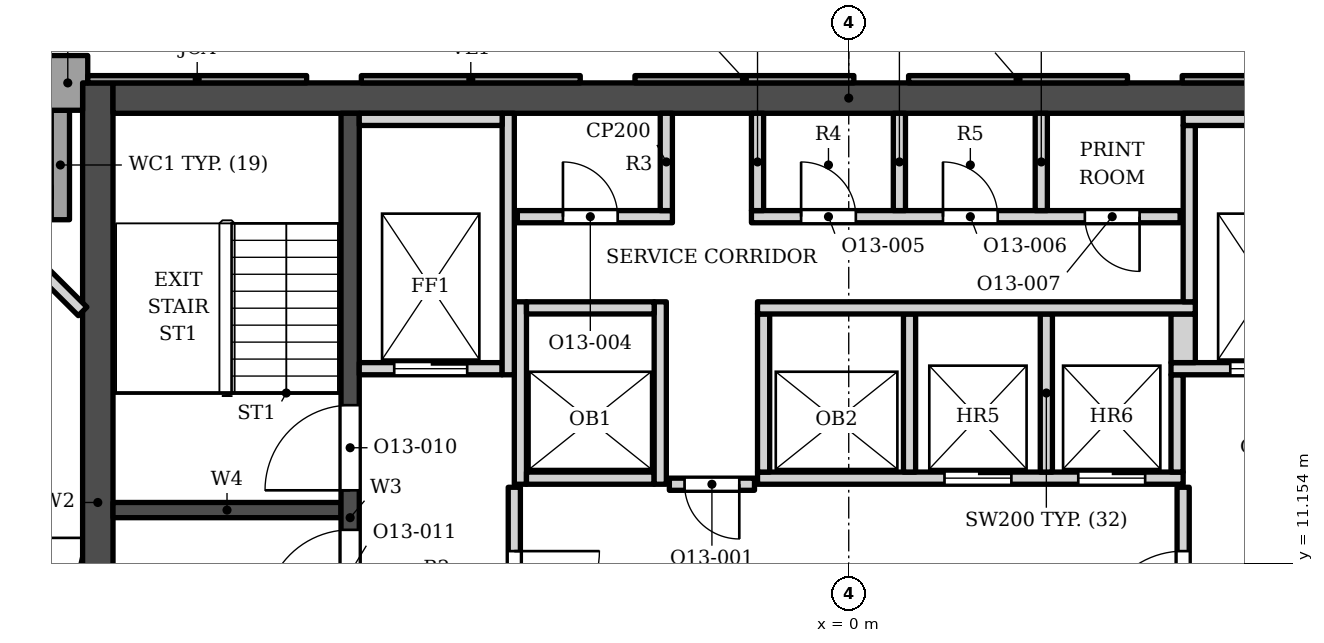
"""IFC4 building model, lengths in metres.
Left out: names, types, materials, properties, quantities, classifications, styles, units other than length and angle.
Written with IfcOpenShell. Run it as: python <this file> out.ifc"""

import sys

from ifc_helpers import new_model, si_unit, direction, frame, frame_2d, origin, place, context, subcontext, project, spatial, polyline, rectangle, outline, extrude, element, fill, save


model = new_model("IFC4")
c1 = context("Model", 3, precision=1e-05, world=origin(), true_north=direction((0.0, 1.0)))
c2 = subcontext(c1, "Body", "Model", "MODEL_VIEW")
j1 = project(units=[si_unit("LENGTHUNIT", "METRE"), si_unit("PLANEANGLEUNIT", "RADIAN")], contexts=[c1])
p1 = place(None, origin())
s1 = spatial("IfcSite", under=j1, at=p1, CompositionType="ELEMENT")
p2 = place(p1, origin())
s2 = spatial("IfcBuilding", under=s1, at=p2, CompositionType="ELEMENT")
p3 = place(p2, frame((0.0, 0.0, 287.2)))
s3 = spatial("IfcBuildingStorey", under=s2, at=p3, CompositionType="ELEMENT", Elevation=287.2)
p4 = place(p3, frame((-12.1, 18.802, 0.0), z_axis=(0.0, 0.0, 1.0), x_axis=(1.0, 0.0, 0.0)))
e1 = element("IfcWall", 1, at=p4, inside=s3, PredefinedType="SHEAR", context=c2, shape_type="SweptSolid", body=[
    extrude(rectangle(XDim=24.2, YDim=0.5, at=frame_2d((12.1, 0.0))), origin(), (0.0, 0.0, 1.0), 3.9),
])
p5 = place(p3, frame((-12.35, 5.253, 0.0), z_axis=(0.0, 0.0, 1.0), x_axis=(0.0, 1.0, 0.0)))
e2 = element("IfcWall", 2, at=p5, inside=s3, PredefinedType="SHEAR", context=c2, shape_type="SweptSolid", body=[
    extrude(rectangle(XDim=13.8, YDim=0.5, at=frame_2d((6.9, 0.0))), origin(), (0.0, 0.0, 1.0), 3.9),
])
p6 = place(p3, frame((-8.2, 5.253, 0.0), z_axis=(0.0, 0.0, 1.0), x_axis=(0.0, 1.0, 0.0)))
e3 = element("IfcWall", 3, at=p6, inside=s3, PredefinedType="SHEAR", context=c2, shape_type="SweptSolid", body=[
    extrude(rectangle(XDim=13.3, YDim=0.3, at=frame_2d((6.65, 0.0))), origin(), (0.0, 0.0, 1.0), 3.9),
])
p7 = place(p6, frame((7.1, 0.0, 0.0)))
e4 = element("IfcOpeningElement", 4, at=p7, cuts=e3, PredefinedType="OPENING", context=c2, shape_type="SweptSolid", body=[
    extrude(rectangle(XDim=1.4, YDim=2.1, at=frame_2d((0.7, 1.05))), frame((0.0, 0.16, 0.0), z_axis=(0.0, -1.0, 0.0), x_axis=(1.0, 0.0, 0.0)), (0.0, 0.0, 1.0), 0.32),
])
p8 = place(p6, frame((5.05, 0.0, 0.0)))
e5 = element("IfcOpeningElement", 5, at=p8, cuts=e3, PredefinedType="OPENING", context=c2, shape_type="SweptSolid", body=[
    extrude(rectangle(XDim=1.4, YDim=2.1, at=frame_2d((0.7, 1.05))), frame((0.0, 0.16, 0.0), z_axis=(0.0, -1.0, 0.0), x_axis=(1.0, 0.0, 0.0)), (0.0, 0.0, 1.0), 0.32),
])
p9 = place(p3, frame((-12.1, 12.028, 0.0), z_axis=(0.0, 0.0, 1.0), x_axis=(1.0, 0.0, 0.0)))
e6 = element("IfcWall", 6, at=p9, inside=s3, PredefinedType="SHEAR", context=c2, shape_type="SweptSolid", body=[
    extrude(rectangle(XDim=3.75, YDim=0.25, at=frame_2d((1.875, 0.0))), origin(), (0.0, 0.0, 1.0), 3.9),
])
p10 = place(p3, origin())
e7 = element("IfcWall", 7, at=p10, inside=s3, PredefinedType="SOLIDWALL", context=c2, shape_type="SweptSolid", body=[
    extrude(outline(polyline([(-12.516, 19.052), (-12.516, 19.502), (-13.416, 19.502), (-13.416, 18.603), (-12.6, 18.603), (-12.6, 19.052), (-12.516, 19.052)])), origin(), (0.0, 0.0, 1.0), 3.0),
])
p11 = place(p3, origin())
e8 = element("IfcWall", 8, at=p11, inside=s3, PredefinedType="SOLIDWALL", context=c2, shape_type="SweptSolid", body=[
    extrude(outline(polyline([(-12.816, 16.802), (-12.816, 18.603), (-13.116, 18.603), (-13.116, 16.802), (-12.816, 16.802)])), origin(), (0.0, 0.0, 1.0), 3.0),
])
p12 = place(p3, origin())
e9 = element("IfcWall", 9, at=p12, inside=s3, PredefinedType="SOLIDWALL", context=c2, shape_type="SweptSolid", body=[
    extrude(outline(polyline([(5.484, 19.173), (5.484, 19.052), (9.084, 19.052), (9.084, 19.173), (5.484, 19.173)])), origin(), (0.0, 0.0, 1.0), 3.0),
])
p13 = place(p3, origin())
e10 = element("IfcWall", 10, at=p13, inside=s3, PredefinedType="ELEMENTEDWALL", context=c2, shape_type="SweptSolid", body=[
    extrude(outline(polyline([(0.984, 19.173), (0.984, 19.052), (4.584, 19.052), (4.584, 19.173), (0.984, 19.173)])), origin(), (0.0, 0.0, 1.0), 3.0),
])
p14 = place(p3, origin())
e11 = element("IfcWall", 11, at=p14, inside=s3, PredefinedType="SOLIDWALL", context=c2, shape_type="SweptSolid", body=[
    extrude(outline(polyline([(-3.516, 19.173), (-3.516, 19.052), (0.084, 19.052), (0.084, 19.173), (-3.516, 19.173)])), origin(), (0.0, 0.0, 1.0), 3.0),
])
p15 = place(p3, origin())
e12 = element("IfcWall", 12, at=p15, inside=s3, PredefinedType="ELEMENTEDWALL", context=c2, shape_type="SweptSolid", body=[
    extrude(outline(polyline([(-8.016, 19.173), (-8.016, 19.052), (-4.416, 19.052), (-4.416, 19.173), (-8.016, 19.173)])), origin(), (0.0, 0.0, 1.0), 3.0),
])
p16 = place(p3, origin())
e13 = element("IfcWall", 13, at=p16, inside=s3, PredefinedType="SOLIDWALL", context=c2, shape_type="SweptSolid", body=[
    extrude(outline(polyline([(-12.515, 19.173), (-12.515, 19.052), (-8.916, 19.052), (-8.916, 19.173), (-12.515, 19.173)])), origin(), (0.0, 0.0, 1.0), 3.0),
])
p17 = place(p3, frame((-5.5, 9.103, 0.0), z_axis=(0.0, 0.0, 1.0), x_axis=(0.0, 1.0, 0.0)))
e14 = element("IfcWall", 14, at=p17, inside=s3, PredefinedType="SOLIDWALL", context=c2, shape_type="SweptSolid", body=[
    extrude(rectangle(XDim=3.3, YDim=0.2, at=frame_2d((1.65, 0.0))), origin(), (0.0, 0.0, 1.0), 3.73),
])
p18 = place(p17, frame((0.85, 0.0, 0.0)))
e15 = element("IfcOpeningElement", 15, at=p18, cuts=e14, PredefinedType="OPENING", context=c2, shape_type="SweptSolid", body=[
    extrude(rectangle(XDim=1.4, YDim=2.1, at=frame_2d((0.7, 1.05))), frame((0.0, 0.11, 0.0), z_axis=(0.0, -1.0, 0.0), x_axis=(1.0, 0.0, 0.0)), (0.0, 0.0, 1.0), 0.22),
])
p19 = place(p3, frame((5.5, 9.103, 0.0), z_axis=(0.0, 0.0, 1.0), x_axis=(0.0, 1.0, 0.0)))
e16 = element("IfcWall", 16, at=p19, inside=s3, PredefinedType="SOLIDWALL", context=c2, shape_type="SweptSolid", body=[
    extrude(rectangle(XDim=3.3, YDim=0.2, at=frame_2d((1.65, 0.0))), origin(), (0.0, 0.0, 1.0), 3.73),
])
p20 = place(p19, frame((0.85, 0.0, 0.0)))
e17 = element("IfcOpeningElement", 17, at=p20, cuts=e16, PredefinedType="OPENING", context=c2, shape_type="SweptSolid", body=[
    extrude(rectangle(XDim=1.4, YDim=2.1, at=frame_2d((0.7, 1.05))), frame((0.0, 0.11, 0.0), z_axis=(0.0, -1.0, 0.0), x_axis=(1.0, 0.0, 0.0)), (0.0, 0.0, 1.0), 0.22),
])
p21 = place(p3, frame((-2.95, 12.453, 0.0), z_axis=(0.0, 0.0, 1.0), x_axis=(1.0, 0.0, 0.0)))
e18 = element("IfcWall", 18, at=p21, inside=s3, PredefinedType="SOLIDWALL", context=c2, shape_type="SweptSolid", body=[
    extrude(rectangle(XDim=1.4, YDim=0.2, at=frame_2d((0.7, 0.0))), origin(), (0.0, 0.0, 1.0), 3.73),
])
p22 = place(p21, frame((0.25, 0.0, 0.0)))
e19 = element("IfcOpeningElement", 19, at=p22, cuts=e18, PredefinedType="OPENING", context=c2, shape_type="SweptSolid", body=[
    extrude(rectangle(XDim=0.9, YDim=2.1, at=frame_2d((0.45, 1.05))), frame((0.0, 0.11, 0.0), z_axis=(0.0, -1.0, 0.0), x_axis=(1.0, 0.0, 0.0)), (0.0, 0.0, 1.0), 0.22),
])
p23 = place(p3, frame((-5.4, 12.453, 0.0), z_axis=(0.0, 0.0, 1.0), x_axis=(0.0, 1.0, 0.0)))
e20 = element("IfcWall", 20, at=p23, inside=s3, PredefinedType="SOLIDWALL", context=c2, shape_type="SweptSolid", body=[
    extrude(rectangle(XDim=3.0, YDim=0.2, at=frame_2d((1.5, 0.0))), origin(), (0.0, 0.0, 1.0), 3.73),
])
p24 = place(p3, frame((-5.3, 12.552, 0.0), z_axis=(0.0, 0.0, 1.0), x_axis=(1.0, 0.0, 0.0)))
e21 = element("IfcWall", 21, at=p24, inside=s3, PredefinedType="SOLIDWALL", context=c2, shape_type="SweptSolid", body=[
    extrude(rectangle(XDim=2.1, YDim=0.2, at=frame_2d((1.05, 0.0))), origin(), (0.0, 0.0, 1.0), 3.73),
])
p25 = place(p3, frame((-3.1, 12.453, 0.0), z_axis=(0.0, 0.0, 1.0), x_axis=(0.0, 1.0, 0.0)))
e22 = element("IfcWall", 22, at=p25, inside=s3, PredefinedType="SOLIDWALL", context=c2, shape_type="SweptSolid", body=[
    extrude(rectangle(XDim=3.0, YDim=0.2, at=frame_2d((1.5, 0.0))), origin(), (0.0, 0.0, 1.0), 3.73),
])
p26 = place(p3, frame((-1.5, 12.552, 0.0), z_axis=(0.0, 0.0, 1.0), x_axis=(1.0, 0.0, 0.0)))
e23 = element("IfcWall", 23, at=p26, inside=s3, PredefinedType="SOLIDWALL", context=c2, shape_type="SweptSolid", body=[
    extrude(rectangle(XDim=7.0, YDim=0.2, at=frame_2d((3.5, 0.0))), origin(), (0.0, 0.0, 1.0), 3.73),
])
p27 = place(p26, frame((3.075, 0.0, 0.0)))
e24 = element("IfcOpeningElement", 24, at=p27, cuts=e23, PredefinedType="OPENING", context=c2, shape_type="SweptSolid", body=[
    extrude(rectangle(XDim=1.1, YDim=2.1, at=frame_2d((0.55, 1.05))), frame((0.0, 0.11, 0.0), z_axis=(0.0, -1.0, 0.0), x_axis=(1.0, 0.0, 0.0)), (0.0, 0.0, 1.0), 0.22),
])
p28 = place(p26, frame((5.275, 0.0, 0.0)))
e25 = element("IfcOpeningElement", 25, at=p28, cuts=e23, PredefinedType="OPENING", context=c2, shape_type="SweptSolid", body=[
    extrude(rectangle(XDim=1.1, YDim=2.1, at=frame_2d((0.55, 1.05))), frame((0.0, 0.11, 0.0), z_axis=(0.0, -1.0, 0.0), x_axis=(1.0, 0.0, 0.0)), (0.0, 0.0, 1.0), 0.22),
])
for number, where, z_axis, x_axis in (
    (26, (-1.4, 12.653, 0.0), (0.0, 0.0, 1.0), (0.0, 1.0, 0.0)),
    (27, (1.0, 12.653, 0.0), (0.0, 0.0, 1.0), (0.0, 1.0, 0.0)),
    (28, (3.25, 12.653, 0.0), (0.0, 0.0, 1.0), (0.0, 1.0, 0.0)),
):
    element("IfcWall", number, at=place(p3, frame(where, z_axis=z_axis, x_axis=x_axis)), inside=s3, PredefinedType="SOLIDWALL", context=c2, shape_type="SweptSolid", body=[
        extrude(rectangle(XDim=2.6, YDim=0.2, at=frame_2d((1.3, 0.0))), origin(), (0.0, 0.0, 1.0), 3.73),
    ])
p29 = place(p3, frame((5.4, 12.653, 0.0), z_axis=(0.0, 0.0, 1.0), x_axis=(0.0, 1.0, 0.0)))
e29 = element("IfcWall", 29, at=p29, inside=s3, PredefinedType="SOLIDWALL", context=c2, shape_type="SweptSolid", body=[
    extrude(rectangle(XDim=1.6, YDim=0.2, at=frame_2d((0.8, 0.0))), origin(), (0.0, 0.0, 1.0), 3.73),
])
p30 = place(p3, frame((-8.05, 14.353, 0.0), z_axis=(0.0, 0.0, 1.0), x_axis=(1.0, 0.0, 0.0)))
e30 = element("IfcWall", 30, at=p30, inside=s3, PredefinedType="SOLIDWALL", context=c2, shape_type="SweptSolid", body=[
    extrude(rectangle(XDim=2.35, YDim=0.2, at=frame_2d((1.175, 0.0))), origin(), (0.0, 0.0, 1.0), 3.73),
])
p31 = place(p30, frame((0.575, 0.0, 0.0)))
e31 = element("IfcOpeningElement", 31, at=p31, cuts=e30, PredefinedType="OPENING", context=c2, shape_type="SweptSolid", body=[
    extrude(rectangle(XDim=1.2, YDim=2.1, at=frame_2d((0.6, 1.05))), frame((0.0, 0.11, 0.0), z_axis=(0.0, -1.0, 0.0), x_axis=(1.0, 0.0, 0.0)), (0.0, 0.0, 1.0), 0.22),
])
p32 = place(p3, frame((-5.6, 14.253, 0.0), z_axis=(0.0, 0.0, 1.0), x_axis=(0.0, 1.0, 0.0)))
e32 = element("IfcWall", 32, at=p32, inside=s3, PredefinedType="SOLIDWALL", context=c2, shape_type="SweptSolid", body=[
    extrude(rectangle(XDim=4.3, YDim=0.2, at=frame_2d((2.15, 0.0))), origin(), (0.0, 0.0, 1.0), 3.73),
])
p33 = place(p3, frame((5.3, 14.353, 0.0), z_axis=(0.0, 0.0, 1.0), x_axis=(1.0, 0.0, 0.0)))
e33 = element("IfcWall", 33, at=p33, inside=s3, PredefinedType="SOLIDWALL", context=c2, shape_type="SweptSolid", body=[
    extrude(rectangle(XDim=2.75, YDim=0.2, at=frame_2d((1.375, 0.0))), origin(), (0.0, 0.0, 1.0), 3.73),
])
p34 = place(p33, frame((0.975, 0.0, 0.0)))
e34 = element("IfcOpeningElement", 34, at=p34, cuts=e33, PredefinedType="OPENING", context=c2, shape_type="SweptSolid", body=[
    extrude(rectangle(XDim=1.2, YDim=2.1, at=frame_2d((0.6, 1.05))), frame((0.0, 0.11, 0.0), z_axis=(0.0, -1.0, 0.0), x_axis=(1.0, 0.0, 0.0)), (0.0, 0.0, 1.0), 0.22),
])
p35 = place(p3, frame((5.5, 14.453, 0.0), z_axis=(0.0, 0.0, 1.0), x_axis=(0.0, 1.0, 0.0)))
e35 = element("IfcWall", 35, at=p35, inside=s3, PredefinedType="SOLIDWALL", context=c2, shape_type="SweptSolid", body=[
    extrude(rectangle(XDim=0.8, YDim=0.4, at=frame_2d((0.4, 0.0))), origin(), (0.0, 0.0, 1.0), 3.73),
])
p36 = place(p3, frame((-5.3, 15.353, 0.0), z_axis=(0.0, 0.0, 1.0), x_axis=(1.0, 0.0, 0.0)))
e36 = element("IfcWall", 36, at=p36, inside=s3, PredefinedType="SOLIDWALL", context=c2, shape_type="SweptSolid", body=[
    extrude(rectangle(XDim=2.1, YDim=0.2, at=frame_2d((1.05, 0.0))), origin(), (0.0, 0.0, 1.0), 3.73),
])
p37 = place(p3, frame((-1.5, 15.353, 0.0), z_axis=(0.0, 0.0, 1.0), x_axis=(1.0, 0.0, 0.0)))
e37 = element("IfcWall", 37, at=p37, inside=s3, PredefinedType="SOLIDWALL", context=c2, shape_type="SweptSolid", body=[
    extrude(rectangle(XDim=7.2, YDim=0.2, at=frame_2d((3.6, 0.0))), origin(), (0.0, 0.0, 1.0), 3.73),
])
p38 = place(p3, frame((5.6, 15.453, 0.0), z_axis=(0.0, 0.0, 1.0), x_axis=(0.0, 1.0, 0.0)))
e38 = element("IfcWall", 38, at=p38, inside=s3, PredefinedType="SOLIDWALL", context=c2, shape_type="SweptSolid", body=[
    extrude(rectangle(XDim=2.9, YDim=0.2, at=frame_2d((1.45, 0.0))), origin(), (0.0, 0.0, 1.0), 3.73),
])
p39 = place(p3, frame((-5.45, 16.853, 0.0), z_axis=(0.0, 0.0, 1.0), x_axis=(1.0, 0.0, 0.0)))
e39 = element("IfcWall", 39, at=p39, inside=s3, PredefinedType="SOLIDWALL", context=c2, shape_type="SweptSolid", body=[
    extrude(rectangle(XDim=2.55, YDim=0.2, at=frame_2d((1.275, 0.0))), origin(), (0.0, 0.0, 1.0), 3.73),
])
p40 = place(p39, frame((0.75, 0.0, 0.0)))
e40 = element("IfcOpeningElement", 40, at=p40, cuts=e39, PredefinedType="OPENING", context=c2, shape_type="SweptSolid", body=[
    extrude(rectangle(XDim=0.9, YDim=2.1, at=frame_2d((0.45, 1.05))), frame((0.0, 0.11, 0.0), z_axis=(0.0, -1.0, 0.0), x_axis=(1.0, 0.0, 0.0)), (0.0, 0.0, 1.0), 0.22),
])
p41 = place(p3, frame((-1.6, 16.853, 0.0), z_axis=(0.0, 0.0, 1.0), x_axis=(1.0, 0.0, 0.0)))
e41 = element("IfcWall", 41, at=p41, inside=s3, PredefinedType="SOLIDWALL", context=c2, shape_type="SweptSolid", body=[
    extrude(rectangle(XDim=7.05, YDim=0.2, at=frame_2d((3.525, 0.0))), origin(), (0.0, 0.0, 1.0), 3.73),
])
p42 = place(p41, frame((0.817, 0.0, 0.0)))
e42 = element("IfcOpeningElement", 42, at=p42, cuts=e41, PredefinedType="OPENING", context=c2, shape_type="SweptSolid", body=[
    extrude(rectangle(XDim=0.9, YDim=2.1, at=frame_2d((0.45, 1.05))), frame((0.0, 0.11, 0.0), z_axis=(0.0, -1.0, 0.0), x_axis=(1.0, 0.0, 0.0)), (0.0, 0.0, 1.0), 0.22),
])
p43 = place(p41, frame((3.15, 0.0, 0.0)))
e43 = element("IfcOpeningElement", 43, at=p43, cuts=e41, PredefinedType="OPENING", context=c2, shape_type="SweptSolid", body=[
    extrude(rectangle(XDim=0.9, YDim=2.1, at=frame_2d((0.45, 1.05))), frame((0.0, 0.11, 0.0), z_axis=(0.0, -1.0, 0.0), x_axis=(1.0, 0.0, 0.0)), (0.0, 0.0, 1.0), 0.22),
])
p44 = place(p41, frame((5.483, 0.0, 0.0)))
e44 = element("IfcOpeningElement", 44, at=p44, cuts=e41, PredefinedType="OPENING", context=c2, shape_type="SweptSolid", body=[
    extrude(rectangle(XDim=0.9, YDim=2.1, at=frame_2d((0.45, 1.05))), frame((0.0, 0.11, 0.0), z_axis=(0.0, -1.0, 0.0), x_axis=(1.0, 0.0, 0.0)), (0.0, 0.0, 1.0), 0.22),
])
for number, where, z_axis, x_axis in (
    (45, (-3.0, 16.953, 0.0), (0.0, 0.0, 1.0), (0.0, 1.0, 0.0)),
    (46, (-1.5, 16.953, 0.0), (0.0, 0.0, 1.0), (0.0, 1.0, 0.0)),
    (47, (0.833, 16.953, 0.0), (0.0, 0.0, 1.0), (0.0, 1.0, 0.0)),
    (48, (3.167, 16.953, 0.0), (0.0, 0.0, 1.0), (0.0, 1.0, 0.0)),
):
    element("IfcWall", number, at=place(p3, frame(where, z_axis=z_axis, x_axis=x_axis)), inside=s3, PredefinedType="PARTITIONING", context=c2, shape_type="SweptSolid", body=[
        extrude(rectangle(XDim=1.6, YDim=0.2, at=frame_2d((0.8, 0.0))), origin(), (0.0, 0.0, 1.0), 3.73),
    ])
p45 = place(p3, frame((-8.05, 18.453, 0.0), z_axis=(0.0, 0.0, 1.0), x_axis=(1.0, 0.0, 0.0)))
e49 = element("IfcWall", 49, at=p45, inside=s3, PredefinedType="SOLIDWALL", context=c2, shape_type="SweptSolid", body=[
    extrude(rectangle(XDim=2.35, YDim=0.2, at=frame_2d((1.175, 0.0))), origin(), (0.0, 0.0, 1.0), 3.73),
])
p46 = place(p3, frame((5.5, 18.453, 0.0), z_axis=(0.0, 0.0, 1.0), x_axis=(1.0, 0.0, 0.0)))
e50 = element("IfcWall", 50, at=p46, inside=s3, PredefinedType="SOLIDWALL", context=c2, shape_type="SweptSolid", body=[
    extrude(rectangle(XDim=2.55, YDim=0.2, at=frame_2d((1.275, 0.0))), origin(), (0.0, 0.0, 1.0), 3.73),
])
p47 = place(p3, frame((-13.26, 15.953, 0.0), z_axis=(0.0, 0.0, 1.0), x_axis=(0.708285399161, -0.705926195389, 0.0)))
e51 = element("IfcWall", 51, at=p47, inside=s3, PredefinedType="PARTITIONING", context=c2, shape_type="SweptSolid", body=[
    extrude(rectangle(XDim=0.931, YDim=0.2, at=frame_2d((0.466, 0.0))), origin(), (0.0, 0.0, 1.0), 3.73),
])
p48 = place(p27, origin())
e52 = element("IfcDoor", 52, at=p48, inside=s3, OperationType="DOUBLE_DOOR_SLIDING", PredefinedType="DOOR", context=c2, shape_type="SweptSolid", body=[
    extrude(rectangle(XDim=1.1, YDim=2.1, at=frame_2d((0.55, 1.05))), frame((0.0, 0.025, 0.0), z_axis=(0.0, -1.0, 0.0), x_axis=(1.0, 0.0, 0.0)), (0.0, 0.0, 1.0), 0.05),
])
fill(e24, e52)
p49 = place(p28, origin())
e53 = element("IfcDoor", 53, at=p49, inside=s3, OperationType="DOUBLE_DOOR_SLIDING", PredefinedType="DOOR", context=c2, shape_type="SweptSolid", body=[
    extrude(rectangle(XDim=1.1, YDim=2.1, at=frame_2d((0.55, 1.05))), frame((0.0, 0.025, 0.0), z_axis=(0.0, -1.0, 0.0), x_axis=(1.0, 0.0, 0.0)), (0.0, 0.0, 1.0), 0.05),
])
fill(e25, e53)
p50 = place(p31, origin())
e54 = element("IfcDoor", 54, at=p50, inside=s3, OperationType="DOUBLE_DOOR_SLIDING", PredefinedType="DOOR", context=c2, shape_type="SweptSolid", body=[
    extrude(rectangle(XDim=1.2, YDim=2.1, at=frame_2d((0.6, 1.05))), frame((0.0, 0.025, 0.0), z_axis=(0.0, -1.0, 0.0), x_axis=(1.0, 0.0, 0.0)), (0.0, 0.0, 1.0), 0.05),
])
fill(e31, e54)
p51 = place(p34, origin())
e55 = element("IfcDoor", 55, at=p51, inside=s3, OperationType="DOUBLE_DOOR_SLIDING", PredefinedType="DOOR", context=c2, shape_type="SweptSolid", body=[
    extrude(rectangle(XDim=1.2, YDim=2.1, at=frame_2d((0.6, 1.05))), frame((0.0, 0.025, 0.0), z_axis=(0.0, -1.0, 0.0), x_axis=(1.0, 0.0, 0.0)), (0.0, 0.0, 1.0), 0.05),
])
fill(e34, e55)
p52 = place(p7, origin())
e56 = element("IfcDoor", 56, at=p52, inside=s3, OperationType="SINGLE_SWING_LEFT", PredefinedType="DOOR", context=c2, shape_type="SweptSolid", body=[
    extrude(rectangle(XDim=1.4, YDim=2.1, at=frame_2d((0.7, 1.05))), frame((0.0, 0.025, 0.0), z_axis=(0.0, -1.0, 0.0), x_axis=(1.0, 0.0, 0.0)), (0.0, 0.0, 1.0), 0.05),
])
fill(e4, e56)
p53 = place(p8, origin())
e57 = element("IfcDoor", 57, at=p53, inside=s3, OperationType="SINGLE_SWING_LEFT", PredefinedType="DOOR", context=c2, shape_type="SweptSolid", body=[
    extrude(rectangle(XDim=1.4, YDim=2.1, at=frame_2d((0.7, 1.05))), frame((0.0, 0.025, 0.0), z_axis=(0.0, -1.0, 0.0), x_axis=(1.0, 0.0, 0.0)), (0.0, 0.0, 1.0), 0.05),
])
fill(e5, e57)
p54 = place(p22, origin())
e58 = element("IfcDoor", 58, at=p54, inside=s3, OperationType="SINGLE_SWING_RIGHT", PredefinedType="DOOR", context=c2, shape_type="SweptSolid", body=[
    extrude(rectangle(XDim=0.9, YDim=2.1, at=frame_2d((0.45, 1.05))), frame((0.0, 0.025, 0.0), z_axis=(0.0, -1.0, 0.0), x_axis=(1.0, 0.0, 0.0)), (0.0, 0.0, 1.0), 0.05),
])
fill(e19, e58)
p55 = place(p18, origin())
e59 = element("IfcDoor", 59, at=p55, inside=s3, OperationType="SINGLE_SWING_RIGHT", PredefinedType="DOOR", context=c2, shape_type="SweptSolid", body=[
    extrude(rectangle(XDim=1.4, YDim=2.1, at=frame_2d((0.7, 1.05))), frame((0.0, 0.025, 0.0), z_axis=(0.0, -1.0, 0.0), x_axis=(1.0, 0.0, 0.0)), (0.0, 0.0, 1.0), 0.05),
])
fill(e15, e59)
p56 = place(p20, origin())
e60 = element("IfcDoor", 60, at=p56, inside=s3, OperationType="SINGLE_SWING_LEFT", PredefinedType="DOOR", context=c2, shape_type="SweptSolid", body=[
    extrude(rectangle(XDim=1.4, YDim=2.1, at=frame_2d((0.7, 1.05))), frame((0.0, 0.025, 0.0), z_axis=(0.0, -1.0, 0.0), x_axis=(1.0, 0.0, 0.0)), (0.0, 0.0, 1.0), 0.05),
])
fill(e17, e60)
p57 = place(p40, origin())
e61 = element("IfcDoor", 61, at=p57, inside=s3, OperationType="SINGLE_SWING_LEFT", PredefinedType="DOOR", context=c2, shape_type="SweptSolid", body=[
    extrude(rectangle(XDim=0.9, YDim=2.1, at=frame_2d((0.45, 1.05))), frame((0.0, 0.025, 0.0), z_axis=(0.0, -1.0, 0.0), x_axis=(1.0, 0.0, 0.0)), (0.0, 0.0, 1.0), 0.05),
])
fill(e40, e61)
p58 = place(p42, origin())
e62 = element("IfcDoor", 62, at=p58, inside=s3, OperationType="SINGLE_SWING_LEFT", PredefinedType="DOOR", context=c2, shape_type="SweptSolid", body=[
    extrude(rectangle(XDim=0.9, YDim=2.1, at=frame_2d((0.45, 1.05))), frame((0.0, 0.025, 0.0), z_axis=(0.0, -1.0, 0.0), x_axis=(1.0, 0.0, 0.0)), (0.0, 0.0, 1.0), 0.05),
])
fill(e42, e62)
p59 = place(p43, origin())
e63 = element("IfcDoor", 63, at=p59, inside=s3, OperationType="SINGLE_SWING_LEFT", PredefinedType="DOOR", context=c2, shape_type="SweptSolid", body=[
    extrude(rectangle(XDim=0.9, YDim=2.1, at=frame_2d((0.45, 1.05))), frame((0.0, 0.025, 0.0), z_axis=(0.0, -1.0, 0.0), x_axis=(1.0, 0.0, 0.0)), (0.0, 0.0, 1.0), 0.05),
])
fill(e43, e63)
p60 = place(p44, origin())
e64 = element("IfcDoor", 64, at=p60, inside=s3, OperationType="SINGLE_SWING_RIGHT", PredefinedType="DOOR", context=c2, shape_type="SweptSolid", body=[
    extrude(rectangle(XDim=0.9, YDim=2.1, at=frame_2d((0.45, 1.05))), frame((0.0, 0.025, 0.0), z_axis=(0.0, -1.0, 0.0), x_axis=(1.0, 0.0, 0.0)), (0.0, 0.0, 1.0), 0.05),
])
fill(e44, e64)
save(model, sys.argv[1])
